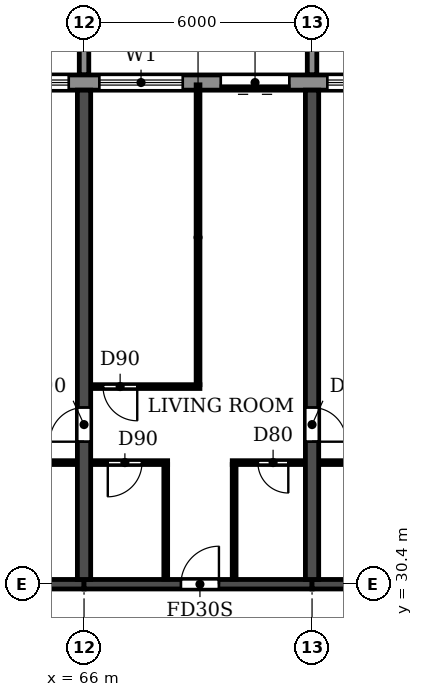
"""IFC4 building model, lengths in metres.
Left out: names, types, materials, properties, quantities, classifications, styles, units other than length and angle.
Written with IfcOpenShell. Run it as: python <this file> out.ifc"""

import sys

from ifc_helpers import new_model, si_unit, direction, frame, frame_2d, origin, place, context, subcontext, project, spatial, polyline, rectangle, outline, extrude, source, transform, mapped, element, fill, save


model = new_model("IFC4")
c1 = context("Model", 3, precision=1e-05, world=origin(), true_north=direction((0.0, 1.0)))
c2 = subcontext(c1, "Body", "Model", "MODEL_VIEW")
j1 = project(units=[si_unit("LENGTHUNIT", "METRE"), si_unit("PLANEANGLEUNIT", "RADIAN")], contexts=[c1])
p1 = place(None, origin())
s1 = spatial("IfcSite", under=j1, at=p1, CompositionType="ELEMENT")
p2 = place(p1, origin())
s2 = spatial("IfcBuilding", under=s1, at=p2, CompositionType="ELEMENT")
p3 = place(p2, frame((0.0, 0.0, 76.2)))
s3 = spatial("IfcBuildingStorey", under=s2, at=p3, CompositionType="ELEMENT", Elevation=76.2)
p4 = place(p3, frame((66.0, 30.525, 0.0), z_axis=(0.0, 0.0, 1.0), x_axis=(0.0, 1.0, 0.0)))
e1 = element("IfcWall", 1, at=p4, inside=s3, PredefinedType="SHEAR", context=c2, shape_type="SweptSolid", body=[
    extrude(rectangle(XDim=12.875, YDim=0.35, at=frame_2d((6.438, 0.0))), origin(), (0.0, 0.0, 1.0), 3.06),
])
p5 = place(p4, frame((3.625, 0.0, 0.0)))
e2 = element("IfcOpeningElement", 2, at=p5, cuts=e1, PredefinedType="OPENING", context=c2, shape_type="SweptSolid", body=[
    extrude(rectangle(XDim=0.9, YDim=2.1, at=frame_2d((0.45, 1.05))), frame((0.0, 0.185, 0.0), z_axis=(0.0, -1.0, 0.0), x_axis=(1.0, 0.0, 0.0)), (0.0, 0.0, 1.0), 0.37),
])
p6 = place(p3, frame((72.0, 30.525, 0.0), z_axis=(0.0, 0.0, 1.0), x_axis=(0.0, 1.0, 0.0)))
e3 = element("IfcWall", 3, at=p6, inside=s3, PredefinedType="SHEAR", context=c2, shape_type="SweptSolid", body=[
    extrude(rectangle(XDim=12.875, YDim=0.35, at=frame_2d((6.438, 0.0))), origin(), (0.0, 0.0, 1.0), 3.06),
])
p7 = place(p6, frame((3.625, 0.0, 0.0)))
e4 = element("IfcOpeningElement", 4, at=p7, cuts=e3, PredefinedType="OPENING", context=c2, shape_type="SweptSolid", body=[
    extrude(rectangle(XDim=0.9, YDim=2.1, at=frame_2d((0.45, 1.05))), frame((0.0, 0.185, 0.0), z_axis=(0.0, -1.0, 0.0), x_axis=(1.0, 0.0, 0.0)), (0.0, 0.0, 1.0), 0.37),
])
p8 = place(p3, frame((60.0, 30.4, 0.0), z_axis=(0.0, 0.0, 1.0), x_axis=(1.0, 0.0, 0.0)))
e5 = element("IfcWall", 5, at=p8, inside=s3, PredefinedType="SHEAR", context=c2, shape_type="SweptSolid", body=[
    extrude(rectangle(XDim=6.0, YDim=0.25, at=frame_2d((3.0, 0.0))), origin(), (0.0, 0.0, 1.0), 2.46),
])
p9 = place(p3, frame((66.0, 30.4, 0.0), z_axis=(0.0, 0.0, 1.0), x_axis=(1.0, 0.0, 0.0)))
e6 = element("IfcWall", 6, at=p9, inside=s3, PredefinedType="SHEAR", context=c2, shape_type="SweptSolid", body=[
    extrude(rectangle(XDim=6.0, YDim=0.25, at=frame_2d((3.0, 0.0))), origin(), (0.0, 0.0, 1.0), 2.46),
])
p10 = place(p9, frame((2.55, 0.0, 0.0)))
e7 = element("IfcOpeningElement", 7, at=p10, cuts=e6, PredefinedType="OPENING", context=c2, shape_type="SweptSolid", body=[
    extrude(rectangle(XDim=1.0, YDim=2.1, at=frame_2d((0.5, 1.05))), frame((0.0, 0.135, 0.0), z_axis=(0.0, -1.0, 0.0), x_axis=(1.0, 0.0, 0.0)), (0.0, 0.0, 1.0), 0.27),
])
p11 = place(p3, frame((72.0, 30.4, 0.0), z_axis=(0.0, 0.0, 1.0), x_axis=(1.0, 0.0, 0.0)))
e8 = element("IfcWall", 8, at=p11, inside=s3, PredefinedType="SHEAR", context=c2, shape_type="SweptSolid", body=[
    extrude(rectangle(XDim=6.0, YDim=0.25, at=frame_2d((3.0, 0.0))), origin(), (0.0, 0.0, 1.0), 2.46),
])
p12 = place(p3, frame((91.317, 43.6, 0.0), z_axis=(0.0, 0.0, 1.0), x_axis=(-1.0, 0.0, 0.0)))
e9 = element("IfcWall", 9, at=p12, inside=s3, PredefinedType="STANDARD", context=c2, shape_type="SweptSolid", body=[
    extrude(rectangle(XDim=80.634, YDim=0.4, at=frame_2d((40.317, 0.0))), origin(), (0.0, 0.0, 1.0), 3.06),
])
p13 = place(p12, frame((76.717, 0.0, 0.9)))
e10 = element("IfcOpeningElement", 10, at=p13, cuts=e9, PredefinedType="OPENING", context=c2, shape_type="SweptSolid", body=[
    extrude(rectangle(XDim=2.2, YDim=1.5, at=frame_2d((1.1, 0.75))), frame((0.0, 0.21, 0.0), z_axis=(0.0, -1.0, 0.0), x_axis=(1.0, 0.0, 0.0)), (0.0, 0.0, 1.0), 0.42),
])
p14 = place(p12, frame((73.917, 0.0, 0.0)))
e11 = element("IfcOpeningElement", 11, at=p14, cuts=e9, PredefinedType="OPENING", context=c2, shape_type="SweptSolid", body=[
    extrude(rectangle(XDim=1.8, YDim=2.4, at=frame_2d((0.9, 1.2))), frame((0.0, 0.21, 0.0), z_axis=(0.0, -1.0, 0.0), x_axis=(1.0, 0.0, 0.0)), (0.0, 0.0, 1.0), 0.42),
])
p15 = place(p12, frame((70.917, 0.0, 0.0)))
e12 = element("IfcOpeningElement", 12, at=p15, cuts=e9, PredefinedType="OPENING", context=c2, shape_type="SweptSolid", body=[
    extrude(rectangle(XDim=1.8, YDim=2.4, at=frame_2d((0.9, 1.2))), frame((0.0, 0.21, 0.0), z_axis=(0.0, -1.0, 0.0), x_axis=(1.0, 0.0, 0.0)), (0.0, 0.0, 1.0), 0.42),
])
p16 = place(p12, frame((67.717, 0.0, 0.9)))
e13 = element("IfcOpeningElement", 13, at=p16, cuts=e9, PredefinedType="OPENING", context=c2, shape_type="SweptSolid", body=[
    extrude(rectangle(XDim=2.2, YDim=1.5, at=frame_2d((1.1, 0.75))), frame((0.0, 0.21, 0.0), z_axis=(0.0, -1.0, 0.0), x_axis=(1.0, 0.0, 0.0)), (0.0, 0.0, 1.0), 0.42),
])
p17 = place(p12, frame((64.717, 0.0, 0.9)))
e14 = element("IfcOpeningElement", 14, at=p17, cuts=e9, PredefinedType="OPENING", context=c2, shape_type="SweptSolid", body=[
    extrude(rectangle(XDim=2.2, YDim=1.5, at=frame_2d((1.1, 0.75))), frame((0.0, 0.21, 0.0), z_axis=(0.0, -1.0, 0.0), x_axis=(1.0, 0.0, 0.0)), (0.0, 0.0, 1.0), 0.42),
])
p18 = place(p12, frame((61.917, 0.0, 0.0)))
e15 = element("IfcOpeningElement", 15, at=p18, cuts=e9, PredefinedType="OPENING", context=c2, shape_type="SweptSolid", body=[
    extrude(rectangle(XDim=1.8, YDim=2.4, at=frame_2d((0.9, 1.2))), frame((0.0, 0.21, 0.0), z_axis=(0.0, -1.0, 0.0), x_axis=(1.0, 0.0, 0.0)), (0.0, 0.0, 1.0), 0.42),
])
p19 = place(p12, frame((58.717, 0.0, 0.9)))
e16 = element("IfcOpeningElement", 16, at=p19, cuts=e9, PredefinedType="OPENING", context=c2, shape_type="SweptSolid", body=[
    extrude(rectangle(XDim=2.2, YDim=1.5, at=frame_2d((1.1, 0.75))), frame((0.0, 0.21, 0.0), z_axis=(0.0, -1.0, 0.0), x_axis=(1.0, 0.0, 0.0)), (0.0, 0.0, 1.0), 0.42),
])
p20 = place(p12, frame((55.917, 0.0, 0.0)))
e17 = element("IfcOpeningElement", 17, at=p20, cuts=e9, PredefinedType="OPENING", context=c2, shape_type="SweptSolid", body=[
    extrude(rectangle(XDim=1.8, YDim=2.4, at=frame_2d((0.9, 1.2))), frame((0.0, 0.21, 0.0), z_axis=(0.0, -1.0, 0.0), x_axis=(1.0, 0.0, 0.0)), (0.0, 0.0, 1.0), 0.42),
])
p21 = place(p12, frame((52.717, 0.0, 0.9)))
e18 = element("IfcOpeningElement", 18, at=p21, cuts=e9, PredefinedType="OPENING", context=c2, shape_type="SweptSolid", body=[
    extrude(rectangle(XDim=2.2, YDim=1.5, at=frame_2d((1.1, 0.75))), frame((0.0, 0.21, 0.0), z_axis=(0.0, -1.0, 0.0), x_axis=(1.0, 0.0, 0.0)), (0.0, 0.0, 1.0), 0.42),
])
p22 = place(p12, frame((49.717, 0.0, 0.9)))
e19 = element("IfcOpeningElement", 19, at=p22, cuts=e9, PredefinedType="OPENING", context=c2, shape_type="SweptSolid", body=[
    extrude(rectangle(XDim=2.2, YDim=1.5, at=frame_2d((1.1, 0.75))), frame((0.0, 0.21, 0.0), z_axis=(0.0, -1.0, 0.0), x_axis=(1.0, 0.0, 0.0)), (0.0, 0.0, 1.0), 0.42),
])
p23 = place(p12, frame((46.917, 0.0, 0.0)))
e20 = element("IfcOpeningElement", 20, at=p23, cuts=e9, PredefinedType="OPENING", context=c2, shape_type="SweptSolid", body=[
    extrude(rectangle(XDim=1.8, YDim=2.4, at=frame_2d((0.9, 1.2))), frame((0.0, 0.21, 0.0), z_axis=(0.0, -1.0, 0.0), x_axis=(1.0, 0.0, 0.0)), (0.0, 0.0, 1.0), 0.42),
])
p24 = place(p12, frame((43.717, 0.0, 0.9)))
e21 = element("IfcOpeningElement", 21, at=p24, cuts=e9, PredefinedType="OPENING", context=c2, shape_type="SweptSolid", body=[
    extrude(rectangle(XDim=2.2, YDim=1.5, at=frame_2d((1.1, 0.75))), frame((0.0, 0.21, 0.0), z_axis=(0.0, -1.0, 0.0), x_axis=(1.0, 0.0, 0.0)), (0.0, 0.0, 1.0), 0.42),
])
p25 = place(p12, frame((40.717, 0.0, 0.9)))
e22 = element("IfcOpeningElement", 22, at=p25, cuts=e9, PredefinedType="OPENING", context=c2, shape_type="SweptSolid", body=[
    extrude(rectangle(XDim=2.2, YDim=1.5, at=frame_2d((1.1, 0.75))), frame((0.0, 0.21, 0.0), z_axis=(0.0, -1.0, 0.0), x_axis=(1.0, 0.0, 0.0)), (0.0, 0.0, 1.0), 0.42),
])
p26 = place(p12, frame((37.917, 0.0, 0.0)))
e23 = element("IfcOpeningElement", 23, at=p26, cuts=e9, PredefinedType="OPENING", context=c2, shape_type="SweptSolid", body=[
    extrude(rectangle(XDim=1.8, YDim=2.4, at=frame_2d((0.9, 1.2))), frame((0.0, 0.21, 0.0), z_axis=(0.0, -1.0, 0.0), x_axis=(1.0, 0.0, 0.0)), (0.0, 0.0, 1.0), 0.42),
])
p27 = place(p12, frame((34.717, 0.0, 0.9)))
e24 = element("IfcOpeningElement", 24, at=p27, cuts=e9, PredefinedType="OPENING", context=c2, shape_type="SweptSolid", body=[
    extrude(rectangle(XDim=2.2, YDim=1.5, at=frame_2d((1.1, 0.75))), frame((0.0, 0.21, 0.0), z_axis=(0.0, -1.0, 0.0), x_axis=(1.0, 0.0, 0.0)), (0.0, 0.0, 1.0), 0.42),
])
p28 = place(p12, frame((31.917, 0.0, 0.0)))
e25 = element("IfcOpeningElement", 25, at=p28, cuts=e9, PredefinedType="OPENING", context=c2, shape_type="SweptSolid", body=[
    extrude(rectangle(XDim=1.8, YDim=2.4, at=frame_2d((0.9, 1.2))), frame((0.0, 0.21, 0.0), z_axis=(0.0, -1.0, 0.0), x_axis=(1.0, 0.0, 0.0)), (0.0, 0.0, 1.0), 0.42),
])
p29 = place(p12, frame((28.717, 0.0, 0.9)))
e26 = element("IfcOpeningElement", 26, at=p29, cuts=e9, PredefinedType="OPENING", context=c2, shape_type="SweptSolid", body=[
    extrude(rectangle(XDim=2.2, YDim=1.5, at=frame_2d((1.1, 0.75))), frame((0.0, 0.21, 0.0), z_axis=(0.0, -1.0, 0.0), x_axis=(1.0, 0.0, 0.0)), (0.0, 0.0, 1.0), 0.42),
])
p30 = place(p12, frame((25.717, 0.0, 0.9)))
e27 = element("IfcOpeningElement", 27, at=p30, cuts=e9, PredefinedType="OPENING", context=c2, shape_type="SweptSolid", body=[
    extrude(rectangle(XDim=2.2, YDim=1.5, at=frame_2d((1.1, 0.75))), frame((0.0, 0.21, 0.0), z_axis=(0.0, -1.0, 0.0), x_axis=(1.0, 0.0, 0.0)), (0.0, 0.0, 1.0), 0.42),
])
p31 = place(p12, frame((22.717, 0.0, 0.9)))
e28 = element("IfcOpeningElement", 28, at=p31, cuts=e9, PredefinedType="OPENING", context=c2, shape_type="SweptSolid", body=[
    extrude(rectangle(XDim=2.2, YDim=1.5, at=frame_2d((1.1, 0.75))), frame((0.0, 0.21, 0.0), z_axis=(0.0, -1.0, 0.0), x_axis=(1.0, 0.0, 0.0)), (0.0, 0.0, 1.0), 0.42),
])
p32 = place(p12, frame((19.917, 0.0, 0.0)))
e29 = element("IfcOpeningElement", 29, at=p32, cuts=e9, PredefinedType="OPENING", context=c2, shape_type="SweptSolid", body=[
    extrude(rectangle(XDim=1.8, YDim=2.4, at=frame_2d((0.9, 1.2))), frame((0.0, 0.21, 0.0), z_axis=(0.0, -1.0, 0.0), x_axis=(1.0, 0.0, 0.0)), (0.0, 0.0, 1.0), 0.42),
])
p33 = place(p12, frame((16.717, 0.0, 0.9)))
e30 = element("IfcOpeningElement", 30, at=p33, cuts=e9, PredefinedType="OPENING", context=c2, shape_type="SweptSolid", body=[
    extrude(rectangle(XDim=2.2, YDim=1.5, at=frame_2d((1.1, 0.75))), frame((0.0, 0.21, 0.0), z_axis=(0.0, -1.0, 0.0), x_axis=(1.0, 0.0, 0.0)), (0.0, 0.0, 1.0), 0.42),
])
p34 = place(p12, frame((13.717, 0.0, 0.9)))
e31 = element("IfcOpeningElement", 31, at=p34, cuts=e9, PredefinedType="OPENING", context=c2, shape_type="SweptSolid", body=[
    extrude(rectangle(XDim=2.2, YDim=1.5, at=frame_2d((1.1, 0.75))), frame((0.0, 0.21, 0.0), z_axis=(0.0, -1.0, 0.0), x_axis=(1.0, 0.0, 0.0)), (0.0, 0.0, 1.0), 0.42),
])
p35 = place(p12, frame((10.717, 0.0, 0.9)))
e32 = element("IfcOpeningElement", 32, at=p35, cuts=e9, PredefinedType="OPENING", context=c2, shape_type="SweptSolid", body=[
    extrude(rectangle(XDim=2.2, YDim=1.5, at=frame_2d((1.1, 0.75))), frame((0.0, 0.21, 0.0), z_axis=(0.0, -1.0, 0.0), x_axis=(1.0, 0.0, 0.0)), (0.0, 0.0, 1.0), 0.42),
])
p36 = place(p12, frame((7.917, 0.0, 0.0)))
e33 = element("IfcOpeningElement", 33, at=p36, cuts=e9, PredefinedType="OPENING", context=c2, shape_type="SweptSolid", body=[
    extrude(rectangle(XDim=1.8, YDim=2.4, at=frame_2d((0.9, 1.2))), frame((0.0, 0.21, 0.0), z_axis=(0.0, -1.0, 0.0), x_axis=(1.0, 0.0, 0.0)), (0.0, 0.0, 1.0), 0.42),
])
p37 = place(p12, frame((4.717, 0.0, 0.9)))
e34 = element("IfcOpeningElement", 34, at=p37, cuts=e9, PredefinedType="OPENING", context=c2, shape_type="SweptSolid", body=[
    extrude(rectangle(XDim=2.2, YDim=1.5, at=frame_2d((1.1, 0.75))), frame((0.0, 0.21, 0.0), z_axis=(0.0, -1.0, 0.0), x_axis=(1.0, 0.0, 0.0)), (0.0, 0.0, 1.0), 0.42),
])
p38 = place(p12, frame((1.917, 0.0, 0.0)))
e35 = element("IfcOpeningElement", 35, at=p38, cuts=e9, PredefinedType="OPENING", context=c2, shape_type="SweptSolid", body=[
    extrude(rectangle(XDim=1.8, YDim=2.4, at=frame_2d((0.9, 1.2))), frame((0.0, 0.21, 0.0), z_axis=(0.0, -1.0, 0.0), x_axis=(1.0, 0.0, 0.0)), (0.0, 0.0, 1.0), 0.42),
])
m1 = source(origin(), c2, "Body", "SweptSolid", [
    extrude(outline(polyline([(0.0, 0.0), (0.25, 0.0), (0.25, 3.1), (0.0, 3.1), (0.0, 0.0)])), origin(), (0.0, 0.0, 1.0), 3.1),
])
for number, where in (
    (36, (65.875, 43.8, 0.0)),
    (37, (71.875, 43.8, 0.0)),
):
    element("IfcWall", number, at=place(p3, frame(where)), inside=s3, PredefinedType="STANDARD", context=c2, shape_type="MappedRepresentation", body=[
        mapped(m1, transform((0.0, 0.0, 0.0))),
    ])
p39 = place(p3, frame((63.1, 33.6, 0.0), z_axis=(0.0, 0.0, 1.0), x_axis=(1.0, 0.0, 0.0)))
e38 = element("IfcWall", 38, at=p39, inside=s3, PredefinedType="PARTITIONING", context=c2, shape_type="SweptSolid", body=[
    extrude(rectangle(XDim=2.715, YDim=0.1, at=frame_2d((1.357, 0.0))), origin(), (0.0, 0.0, 1.0), 3.06),
])
p40 = place(p39, frame((1.0, 0.0, 0.0)))
e39 = element("IfcOpeningElement", 39, at=p40, cuts=e38, PredefinedType="OPENING", context=c2, shape_type="SweptSolid", body=[
    extrude(rectangle(XDim=0.8, YDim=2.1, at=frame_2d((0.4, 1.05))), frame((0.0, 0.06, 0.0), z_axis=(0.0, -1.0, 0.0), x_axis=(1.0, 0.0, 0.0)), (0.0, 0.0, 1.0), 0.12),
])
p41 = place(p3, frame((66.185, 33.6, 0.0), z_axis=(0.0, 0.0, 1.0), x_axis=(1.0, 0.0, 0.0)))
e40 = element("IfcWall", 40, at=p41, inside=s3, PredefinedType="PARTITIONING", context=c2, shape_type="SweptSolid", body=[
    extrude(rectangle(XDim=2.015, YDim=0.1, at=frame_2d((1.007, 0.0))), origin(), (0.0, 0.0, 1.0), 3.06),
])
p42 = place(p41, frame((0.44, 0.0, 0.0)))
e41 = element("IfcOpeningElement", 41, at=p42, cuts=e40, PredefinedType="OPENING", context=c2, shape_type="SweptSolid", body=[
    extrude(rectangle(XDim=0.9, YDim=2.1, at=frame_2d((0.45, 1.05))), frame((0.0, 0.06, 0.0), z_axis=(0.0, -1.0, 0.0), x_axis=(1.0, 0.0, 0.0)), (0.0, 0.0, 1.0), 0.12),
])
p43 = place(p3, frame((69.9, 33.6, 0.0), z_axis=(0.0, 0.0, 1.0), x_axis=(1.0, 0.0, 0.0)))
e42 = element("IfcWall", 42, at=p43, inside=s3, PredefinedType="PARTITIONING", context=c2, shape_type="SweptSolid", body=[
    extrude(rectangle(XDim=1.915, YDim=0.1, at=frame_2d((0.958, 0.0))), origin(), (0.0, 0.0, 1.0), 3.06),
])
p44 = place(p43, frame((0.675, 0.0, 0.0)))
e43 = element("IfcOpeningElement", 43, at=p44, cuts=e42, PredefinedType="OPENING", context=c2, shape_type="SweptSolid", body=[
    extrude(rectangle(XDim=0.8, YDim=2.1, at=frame_2d((0.4, 1.05))), frame((0.0, 0.06, 0.0), z_axis=(0.0, -1.0, 0.0), x_axis=(1.0, 0.0, 0.0)), (0.0, 0.0, 1.0), 0.12),
])
p45 = place(p3, frame((72.185, 33.6, 0.0), z_axis=(0.0, 0.0, 1.0), x_axis=(1.0, 0.0, 0.0)))
e44 = element("IfcWall", 44, at=p45, inside=s3, PredefinedType="PARTITIONING", context=c2, shape_type="SweptSolid", body=[
    extrude(rectangle(XDim=2.715, YDim=0.1, at=frame_2d((1.357, 0.0))), origin(), (0.0, 0.0, 1.0), 3.06),
])
p46 = place(p45, frame((0.915, 0.0, 0.0)))
e45 = element("IfcOpeningElement", 45, at=p46, cuts=e44, PredefinedType="OPENING", context=c2, shape_type="SweptSolid", body=[
    extrude(rectangle(XDim=0.8, YDim=2.1, at=frame_2d((0.4, 1.05))), frame((0.0, 0.06, 0.0), z_axis=(0.0, -1.0, 0.0), x_axis=(1.0, 0.0, 0.0)), (0.0, 0.0, 1.0), 0.12),
])
p47 = place(p3, frame((66.185, 35.6, 0.0), z_axis=(0.0, 0.0, 1.0), x_axis=(1.0, 0.0, 0.0)))
e46 = element("IfcWall", 46, at=p47, inside=s3, PredefinedType="PARTITIONING", context=c2, shape_type="SweptSolid", body=[
    extrude(rectangle(XDim=2.865, YDim=0.1, at=frame_2d((1.433, 0.0))), origin(), (0.0, 0.0, 1.0), 3.06),
])
p48 = place(p47, frame((0.315, 0.0, 0.0)))
e47 = element("IfcOpeningElement", 47, at=p48, cuts=e46, PredefinedType="OPENING", context=c2, shape_type="SweptSolid", body=[
    extrude(rectangle(XDim=0.9, YDim=2.1, at=frame_2d((0.45, 1.05))), frame((0.0, 0.06, 0.0), z_axis=(0.0, -1.0, 0.0), x_axis=(1.0, 0.0, 0.0)), (0.0, 0.0, 1.0), 0.12),
])
p49 = place(p3, frame((68.15, 30.535, 0.0), z_axis=(0.0, 0.0, 1.0), x_axis=(0.0, 1.0, 0.0)))
e48 = element("IfcWall", 48, at=p49, inside=s3, PredefinedType="PARTITIONING", context=c2, shape_type="SweptSolid", body=[
    extrude(rectangle(XDim=3.015, YDim=0.1, at=frame_2d((1.508, 0.0))), origin(), (0.0, 0.0, 1.0), 3.06),
])
p50 = place(p3, frame((69.0, 35.65, 0.0), z_axis=(0.0, 0.0, 1.0), x_axis=(0.0, 1.0, 0.0)))
e49 = element("IfcWall", 49, at=p50, inside=s3, PredefinedType="PARTITIONING", context=c2, shape_type="SweptSolid", body=[
    extrude(rectangle(XDim=7.89, YDim=0.1, at=frame_2d((3.945, 0.0))), origin(), (0.0, 0.0, 1.0), 3.06),
])
p51 = place(p3, frame((69.95, 30.535, 0.0), z_axis=(0.0, 0.0, 1.0), x_axis=(0.0, 1.0, 0.0)))
e50 = element("IfcWall", 50, at=p51, inside=s3, PredefinedType="PARTITIONING", context=c2, shape_type="SweptSolid", body=[
    extrude(rectangle(XDim=3.015, YDim=0.1, at=frame_2d((1.508, 0.0))), origin(), (0.0, 0.0, 1.0), 3.06),
])
p52 = place(p30, origin())
e51 = element("IfcWindow", 51, at=p52, inside=s3, PartitioningType="DOUBLE_PANEL_HORIZONTAL", PredefinedType="WINDOW", context=c2, shape_type="SweptSolid", body=[
    extrude(rectangle(XDim=2.2, YDim=1.5, at=frame_2d((1.1, 0.75))), frame((0.0, 0.03, 0.0), z_axis=(0.0, -1.0, 0.0), x_axis=(1.0, 0.0, 0.0)), (0.0, 0.0, 1.0), 0.06),
])
fill(e27, e51)
p53 = place(p31, origin())
e52 = element("IfcWindow", 52, at=p53, inside=s3, PartitioningType="DOUBLE_PANEL_HORIZONTAL", PredefinedType="WINDOW", context=c2, shape_type="SweptSolid", body=[
    extrude(rectangle(XDim=2.2, YDim=1.5, at=frame_2d((1.1, 0.75))), frame((0.0, 0.03, 0.0), z_axis=(0.0, -1.0, 0.0), x_axis=(1.0, 0.0, 0.0)), (0.0, 0.0, 1.0), 0.06),
])
fill(e28, e52)
p54 = place(p32, origin())
e53 = element("IfcDoor", 53, at=p54, inside=s3, OperationType="DOUBLE_DOOR_SLIDING", PredefinedType="DOOR", context=c2, shape_type="SweptSolid", body=[
    extrude(rectangle(XDim=1.8, YDim=2.4, at=frame_2d((0.9, 1.2))), frame((0.0, 0.025, 0.0), z_axis=(0.0, -1.0, 0.0), x_axis=(1.0, 0.0, 0.0)), (0.0, 0.0, 1.0), 0.05),
])
fill(e29, e53)
p55 = place(p33, origin())
e54 = element("IfcWindow", 54, at=p55, inside=s3, PartitioningType="DOUBLE_PANEL_HORIZONTAL", PredefinedType="WINDOW", context=c2, shape_type="SweptSolid", body=[
    extrude(rectangle(XDim=2.2, YDim=1.5, at=frame_2d((1.1, 0.75))), frame((0.0, 0.03, 0.0), z_axis=(0.0, -1.0, 0.0), x_axis=(1.0, 0.0, 0.0)), (0.0, 0.0, 1.0), 0.06),
])
fill(e30, e54)
p56 = place(p5, origin())
e55 = element("IfcDoor", 55, at=p56, inside=s3, OperationType="SINGLE_SWING_LEFT", PredefinedType="DOOR", context=c2, shape_type="SweptSolid", body=[
    extrude(rectangle(XDim=0.9, YDim=2.1, at=frame_2d((0.45, 1.05))), frame((0.0, 0.025, 0.0), z_axis=(0.0, -1.0, 0.0), x_axis=(1.0, 0.0, 0.0)), (0.0, 0.0, 1.0), 0.05),
])
fill(e2, e55)
p57 = place(p48, frame((0.9, 0.0, 0.0), z_axis=(0.0, 0.0, 1.0), x_axis=(-1.0, 0.0, 0.0)))
e56 = element("IfcDoor", 56, at=p57, inside=s3, OperationType="SINGLE_SWING_LEFT", PredefinedType="DOOR", context=c2, shape_type="SweptSolid", body=[
    extrude(rectangle(XDim=0.9, YDim=2.1, at=frame_2d((0.45, 1.05))), frame((0.0, 0.025, 0.0), z_axis=(0.0, -1.0, 0.0), x_axis=(1.0, 0.0, 0.0)), (0.0, 0.0, 1.0), 0.05),
])
fill(e47, e56)
p58 = place(p42, frame((0.9, 0.0, 0.0), z_axis=(0.0, 0.0, 1.0), x_axis=(-1.0, 0.0, 0.0)))
e57 = element("IfcDoor", 57, at=p58, inside=s3, OperationType="SINGLE_SWING_RIGHT", PredefinedType="DOOR", context=c2, shape_type="SweptSolid", body=[
    extrude(rectangle(XDim=0.9, YDim=2.1, at=frame_2d((0.45, 1.05))), frame((0.0, 0.025, 0.0), z_axis=(0.0, -1.0, 0.0), x_axis=(1.0, 0.0, 0.0)), (0.0, 0.0, 1.0), 0.05),
])
fill(e41, e57)
p59 = place(p10, origin())
e58 = element("IfcDoor", 58, at=p59, inside=s3, OperationType="SINGLE_SWING_RIGHT", PredefinedType="DOOR", context=c2, shape_type="SweptSolid", body=[
    extrude(rectangle(XDim=1.0, YDim=2.1, at=frame_2d((0.5, 1.05))), frame((0.0, 0.025, 0.0), z_axis=(0.0, -1.0, 0.0), x_axis=(1.0, 0.0, 0.0)), (0.0, 0.0, 1.0), 0.05),
])
fill(e7, e58)
p60 = place(p44, frame((0.8, 0.0, 0.0), z_axis=(0.0, 0.0, 1.0), x_axis=(-1.0, 0.0, 0.0)))
e59 = element("IfcDoor", 59, at=p60, inside=s3, OperationType="SINGLE_SWING_LEFT", PredefinedType="DOOR", context=c2, shape_type="SweptSolid", body=[
    extrude(rectangle(XDim=0.8, YDim=2.1, at=frame_2d((0.4, 1.05))), frame((0.0, 0.025, 0.0), z_axis=(0.0, -1.0, 0.0), x_axis=(1.0, 0.0, 0.0)), (0.0, 0.0, 1.0), 0.05),
])
fill(e43, e59)
p61 = place(p7, frame((0.9, 0.0, 0.0), z_axis=(0.0, 0.0, 1.0), x_axis=(-1.0, 0.0, 0.0)))
e60 = element("IfcDoor", 60, at=p61, inside=s3, OperationType="SINGLE_SWING_RIGHT", PredefinedType="DOOR", context=c2, shape_type="SweptSolid", body=[
    extrude(rectangle(XDim=0.9, YDim=2.1, at=frame_2d((0.45, 1.05))), frame((0.0, 0.025, 0.0), z_axis=(0.0, -1.0, 0.0), x_axis=(1.0, 0.0, 0.0)), (0.0, 0.0, 1.0), 0.05),
])
fill(e4, e60)
save(model, sys.argv[1])
